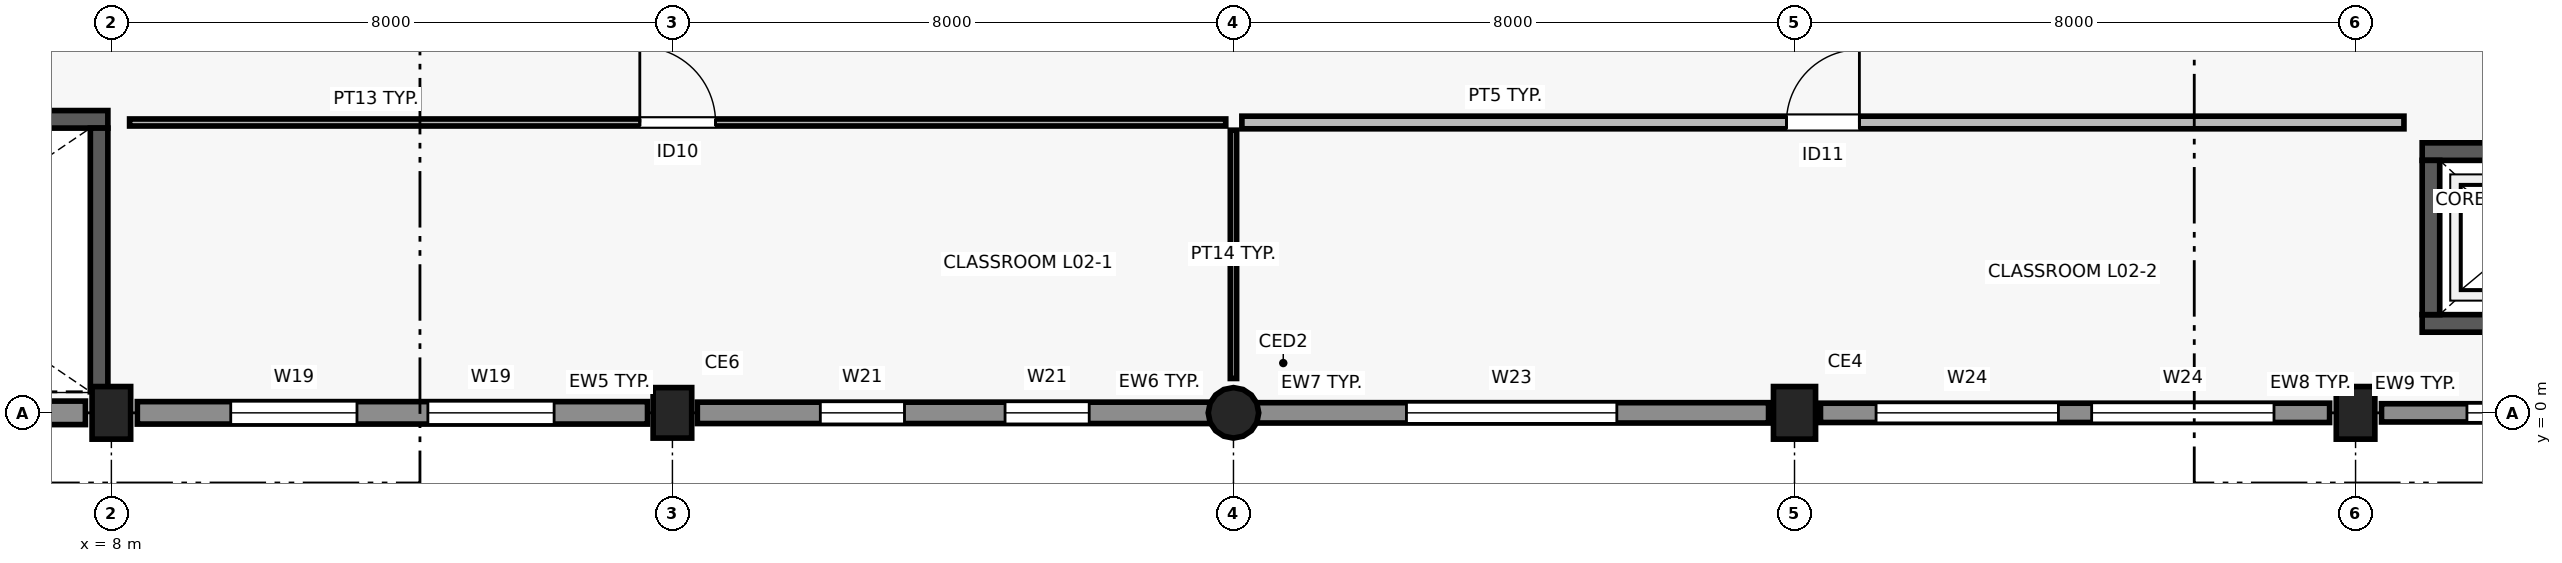
"""IFC4 building model, lengths in metres.
Left out: names, types, materials, properties, quantities, classifications, styles, units other than length and angle.
Written with IfcOpenShell. Run it as: python <this file> out.ifc"""

import sys

from ifc_helpers import new_model, si_unit, direction, frame, frame_2d, origin, origin_2d, place, context, subcontext, project, spatial, rectangle, circle, extrude, element, fill, save


model = new_model("IFC4")
c1 = context("Model", 3, precision=1e-05, world=origin(), true_north=direction((0.0, 1.0)))
c2 = subcontext(c1, "Body", "Model", "MODEL_VIEW")
j1 = project(units=[si_unit("LENGTHUNIT", "METRE"), si_unit("PLANEANGLEUNIT", "RADIAN")], contexts=[c1])
p1 = place(None, origin())
s1 = spatial("IfcSite", under=j1, at=p1, CompositionType="ELEMENT")
p2 = place(p1, origin())
s2 = spatial("IfcBuilding", under=s1, at=p2, CompositionType="ELEMENT")
p3 = place(p2, frame((0.0, 0.0, 9.0)))
s3 = spatial("IfcBuildingStorey", under=s2, at=p3, CompositionType="ELEMENT", Elevation=9.0)
p4 = place(p3, frame((8.0, 0.0, 0.0), z_axis=(0.0, 0.0, 1.0), x_axis=(1.0, 0.0, 0.0)))
e1 = element("IfcColumn", 1, at=p4, inside=s3, PredefinedType="COLUMN", context=c2, shape_type="SweptSolid", body=[
    extrude(rectangle(XDim=0.75, YDim=0.55, at=origin_2d()), origin(), (0.0, 0.0, 1.0), 4.2),
])
p5 = place(p3, frame((16.0, 0.0, 0.0), z_axis=(0.0, 0.0, 1.0), x_axis=(1.0, 0.0, 0.0)))
e2 = element("IfcColumn", 2, at=p5, inside=s3, PredefinedType="COLUMN", context=c2, shape_type="SweptSolid", body=[
    extrude(rectangle(XDim=0.72, YDim=0.55, at=origin_2d()), origin(), (0.0, 0.0, 1.0), 4.2),
])
p6 = place(p3, frame((24.0, 0.0, 0.0), z_axis=(0.0, 0.0, 1.0), x_axis=(1.0, 0.0, 0.0)))
e3 = element("IfcColumn", 3, at=p6, inside=s3, PredefinedType="COLUMN", context=c2, shape_type="SweptSolid", body=[
    extrude(circle(Radius=0.36, at=origin_2d()), origin(), (0.0, 0.0, 1.0), 4.2),
])
p7 = place(p3, frame((32.0, 0.0, 0.0), z_axis=(0.0, 0.0, 1.0), x_axis=(1.0, 0.0, 0.0)))
e4 = element("IfcColumn", 4, at=p7, inside=s3, PredefinedType="COLUMN", context=c2, shape_type="SweptSolid", body=[
    extrude(rectangle(XDim=0.75, YDim=0.6, at=origin_2d()), origin(), (0.0, 0.0, 1.0), 4.2),
])
p8 = place(p3, frame((40.0, 0.0, 0.0), z_axis=(0.0, 0.0, 1.0), x_axis=(1.0, 0.0, 0.0)))
e5 = element("IfcColumn", 5, at=p8, inside=s3, PredefinedType="COLUMN", context=c2, shape_type="SweptSolid", body=[
    extrude(rectangle(XDim=0.75, YDim=0.55, at=origin_2d()), origin(), (0.0, 0.0, 1.0), 4.2),
])
p9 = place(p3, frame((0.37, 0.0, 0.0), z_axis=(0.0, 0.0, 1.0), x_axis=(1.0, 0.0, 0.0)))
e6 = element("IfcWall", 6, at=p9, inside=s3, PredefinedType="SOLIDWALL", context=c2, shape_type="SweptSolid", body=[
    extrude(rectangle(XDim=7.26, YDim=0.335, at=frame_2d((3.63, 0.0))), origin(), (0.0, 0.0, 1.0), 3.92),
])
p10 = place(p3, frame((8.37, 0.0, 0.0), z_axis=(0.0, 0.0, 1.0), x_axis=(1.0, 0.0, 0.0)))
e7 = element("IfcWall", 7, at=p10, inside=s3, PredefinedType="SOLIDWALL", context=c2, shape_type="SweptSolid", body=[
    extrude(rectangle(XDim=7.275, YDim=0.32, at=frame_2d((3.637, 0.0))), origin(), (0.0, 0.0, 1.0), 3.92),
])
p11 = place(p10, frame((1.332, 0.0, 0.9)))
e8 = element("IfcOpeningElement", 8, at=p11, cuts=e7, PredefinedType="OPENING", context=c2, shape_type="SweptSolid", body=[
    extrude(rectangle(XDim=1.8, YDim=1.25, at=frame_2d((0.9, 0.625))), frame((0.0, 0.17, 0.0), z_axis=(0.0, -1.0, 0.0), x_axis=(1.0, 0.0, 0.0)), (0.0, 0.0, 1.0), 0.34),
])
p12 = place(p10, frame((4.143, 0.0, 0.9)))
e9 = element("IfcOpeningElement", 9, at=p12, cuts=e7, PredefinedType="OPENING", context=c2, shape_type="SweptSolid", body=[
    extrude(rectangle(XDim=1.8, YDim=1.25, at=frame_2d((0.9, 0.625))), frame((0.0, 0.17, 0.0), z_axis=(0.0, -1.0, 0.0), x_axis=(1.0, 0.0, 0.0)), (0.0, 0.0, 1.0), 0.34),
])
p13 = place(p3, frame((16.355, 0.0, 0.0), z_axis=(0.0, 0.0, 1.0), x_axis=(1.0, 0.0, 0.0)))
e10 = element("IfcWall", 10, at=p13, inside=s3, PredefinedType="SOLIDWALL", context=c2, shape_type="SweptSolid", body=[
    extrude(rectangle(XDim=7.343, YDim=0.305, at=frame_2d((3.671, 0.0))), origin(), (0.0, 0.0, 1.0), 3.27),
])
p14 = place(p13, frame((1.754, 0.0, 0.9)))
e11 = element("IfcOpeningElement", 11, at=p14, cuts=e10, PredefinedType="OPENING", context=c2, shape_type="SweptSolid", body=[
    extrude(rectangle(XDim=1.2, YDim=1.25, at=frame_2d((0.6, 0.625))), frame((0.0, 0.162, 0.0), z_axis=(0.0, -1.0, 0.0), x_axis=(1.0, 0.0, 0.0)), (0.0, 0.0, 1.0), 0.325),
])
p15 = place(p13, frame((4.388, 0.0, 0.9)))
e12 = element("IfcOpeningElement", 12, at=p15, cuts=e10, PredefinedType="OPENING", context=c2, shape_type="SweptSolid", body=[
    extrude(rectangle(XDim=1.2, YDim=1.25, at=frame_2d((0.6, 0.625))), frame((0.0, 0.162, 0.0), z_axis=(0.0, -1.0, 0.0), x_axis=(1.0, 0.0, 0.0)), (0.0, 0.0, 1.0), 0.325),
])
p16 = place(p3, frame((24.302, 0.0, 0.0), z_axis=(0.0, 0.0, 1.0), x_axis=(1.0, 0.0, 0.0)))
e13 = element("IfcWall", 13, at=p16, inside=s3, PredefinedType="SOLIDWALL", context=c2, shape_type="SweptSolid", body=[
    extrude(rectangle(XDim=7.327, YDim=0.29, at=frame_2d((3.664, 0.0))), origin(), (0.0, 0.0, 1.0), 3.27),
])
p17 = place(p16, frame((2.164, 0.0, 0.9)))
e14 = element("IfcOpeningElement", 14, at=p17, cuts=e13, PredefinedType="OPENING", context=c2, shape_type="SweptSolid", body=[
    extrude(rectangle(XDim=3.0, YDim=1.65, at=frame_2d((1.5, 0.825))), frame((0.0, 0.155, 0.0), z_axis=(0.0, -1.0, 0.0), x_axis=(1.0, 0.0, 0.0)), (0.0, 0.0, 1.0), 0.31),
])
p18 = place(p3, frame((32.37, 0.0, 0.0), z_axis=(0.0, 0.0, 1.0), x_axis=(1.0, 0.0, 0.0)))
e15 = element("IfcWall", 15, at=p18, inside=s3, PredefinedType="SOLIDWALL", context=c2, shape_type="SweptSolid", body=[
    extrude(rectangle(XDim=7.26, YDim=0.275, at=frame_2d((3.63, 0.0))), origin(), (0.0, 0.0, 1.0), 3.37),
])
p19 = place(p18, frame((0.793, 0.0, 0.9)))
e16 = element("IfcOpeningElement", 16, at=p19, cuts=e15, PredefinedType="OPENING", context=c2, shape_type="SweptSolid", body=[
    extrude(rectangle(XDim=2.6, YDim=1.65, at=frame_2d((1.3, 0.825))), frame((0.0, 0.147, 0.0), z_axis=(0.0, -1.0, 0.0), x_axis=(1.0, 0.0, 0.0)), (0.0, 0.0, 1.0), 0.295),
])
p20 = place(p18, frame((3.867, 0.0, 0.9)))
e17 = element("IfcOpeningElement", 17, at=p20, cuts=e15, PredefinedType="OPENING", context=c2, shape_type="SweptSolid", body=[
    extrude(rectangle(XDim=2.6, YDim=1.65, at=frame_2d((1.3, 0.825))), frame((0.0, 0.147, 0.0), z_axis=(0.0, -1.0, 0.0), x_axis=(1.0, 0.0, 0.0)), (0.0, 0.0, 1.0), 0.295),
])
p21 = place(p3, frame((40.37, 0.0, 0.0), z_axis=(0.0, 0.0, 1.0), x_axis=(1.0, 0.0, 0.0)))
e18 = element("IfcWall", 18, at=p21, inside=s3, PredefinedType="SOLIDWALL", context=c2, shape_type="SweptSolid", body=[
    extrude(rectangle(XDim=7.275, YDim=0.26, at=frame_2d((3.637, 0.0))), origin(), (0.0, 0.0, 1.0), 3.27),
])
p22 = place(p21, frame((1.218, 0.0, 0.9)))
e19 = element("IfcOpeningElement", 19, at=p22, cuts=e18, PredefinedType="OPENING", context=c2, shape_type="SweptSolid", body=[
    extrude(rectangle(XDim=2.4, YDim=1.8, at=frame_2d((1.2, 0.9))), frame((0.0, 0.14, 0.0), z_axis=(0.0, -1.0, 0.0), x_axis=(1.0, 0.0, 0.0)), (0.0, 0.0, 1.0), 0.28),
])
p23 = place(p21, frame((4.087, 0.0, 0.9)))
e20 = element("IfcOpeningElement", 20, at=p23, cuts=e18, PredefinedType="OPENING", context=c2, shape_type="SweptSolid", body=[
    extrude(rectangle(XDim=2.4, YDim=1.8, at=frame_2d((1.2, 0.9))), frame((0.0, 0.14, 0.0), z_axis=(0.0, -1.0, 0.0), x_axis=(1.0, 0.0, 0.0)), (0.0, 0.0, 1.0), 0.28),
])
p24 = place(p3, frame((40.95, 1.275, 0.0), z_axis=(0.0, 0.0, 1.0), x_axis=(1.0, 0.0, 0.0)))
e21 = element("IfcWall", 21, at=p24, inside=s3, PredefinedType="SHEAR", context=c2, shape_type="SweptSolid", body=[
    extrude(rectangle(XDim=2.9, YDim=0.25, at=frame_2d((1.45, 0.0))), origin(), (0.0, 0.0, 1.0), 3.92),
])
p25 = place(p3, frame((40.95, 3.725, 0.0), z_axis=(0.0, 0.0, 1.0), x_axis=(1.0, 0.0, 0.0)))
e22 = element("IfcWall", 22, at=p25, inside=s3, PredefinedType="SHEAR", context=c2, shape_type="SweptSolid", body=[
    extrude(rectangle(XDim=2.9, YDim=0.25, at=frame_2d((1.45, 0.0))), origin(), (0.0, 0.0, 1.0), 3.92),
])
p26 = place(p25, frame((0.95, 0.0, 0.0)))
e23 = element("IfcOpeningElement", 23, at=p26, cuts=e22, PredefinedType="OPENING", context=c2, shape_type="SweptSolid", body=[
    extrude(rectangle(XDim=1.0, YDim=2.15, at=frame_2d((0.5, 1.075))), frame((0.0, 0.135, 0.0), z_axis=(0.0, -1.0, 0.0), x_axis=(1.0, 0.0, 0.0)), (0.0, 0.0, 1.0), 0.27),
])
p27 = place(p3, frame((41.075, 1.4, 0.0), z_axis=(0.0, 0.0, 1.0), x_axis=(0.0, 1.0, 0.0)))
e24 = element("IfcWall", 24, at=p27, inside=s3, PredefinedType="SHEAR", context=c2, shape_type="SweptSolid", body=[
    extrude(rectangle(XDim=2.2, YDim=0.25, at=frame_2d((1.1, 0.0))), origin(), (0.0, 0.0, 1.0), 3.92),
])
p28 = place(p3, frame((0.05, 4.185, 0.0), z_axis=(0.0, 0.0, 1.0), x_axis=(1.0, 0.0, 0.0)))
e25 = element("IfcWall", 25, at=p28, inside=s3, PredefinedType="SHEAR", context=c2, shape_type="SweptSolid", body=[
    extrude(rectangle(XDim=7.9, YDim=0.25, at=frame_2d((3.95, 0.0))), origin(), (0.0, 0.0, 1.0), 3.92),
])
p29 = place(p28, frame((0.5, 0.0, 0.0)))
e26 = element("IfcOpeningElement", 26, at=p29, cuts=e25, PredefinedType="OPENING", context=c2, shape_type="SweptSolid", body=[
    extrude(rectangle(XDim=1.25, YDim=2.2, at=frame_2d((0.625, 1.1))), frame((0.0, 0.135, 0.0), z_axis=(0.0, -1.0, 0.0), x_axis=(1.0, 0.0, 0.0)), (0.0, 0.0, 1.0), 0.27),
])
p30 = place(p3, frame((7.825, 0.3, 0.0), z_axis=(0.0, 0.0, 1.0), x_axis=(0.0, 1.0, 0.0)))
e27 = element("IfcWall", 27, at=p30, inside=s3, PredefinedType="SHEAR", context=c2, shape_type="SweptSolid", body=[
    extrude(rectangle(XDim=3.76, YDim=0.25, at=frame_2d((1.88, 0.0))), origin(), (0.0, 0.0, 1.0), 3.92),
])
p31 = place(p3, frame((8.26, 4.14, 0.0), z_axis=(0.0, 0.0, 1.0), x_axis=(1.0, 0.0, 0.0)))
e28 = element("IfcWall", 28, at=p31, inside=s3, PredefinedType="PARTITIONING", context=c2, shape_type="SweptSolid", body=[
    extrude(rectangle(XDim=15.63, YDim=0.1, at=frame_2d((7.815, 0.0))), origin(), (0.0, 0.0, 1.0), 3.9),
])
p32 = place(p31, frame((7.275, 0.0, 0.0)))
e29 = element("IfcOpeningElement", 29, at=p32, cuts=e28, PredefinedType="OPENING", context=c2, shape_type="SweptSolid", body=[
    extrude(rectangle(XDim=1.08, YDim=2.15, at=frame_2d((0.54, 1.075))), frame((0.0, 0.06, 0.0), z_axis=(0.0, -1.0, 0.0), x_axis=(1.0, 0.0, 0.0)), (0.0, 0.0, 1.0), 0.12),
])
p33 = place(p3, frame((24.0, 0.49, 0.0), z_axis=(0.0, 0.0, 1.0), x_axis=(0.0, 1.0, 0.0)))
e30 = element("IfcWall", 30, at=p33, inside=s3, PredefinedType="PARTITIONING", context=c2, shape_type="SweptSolid", body=[
    extrude(rectangle(XDim=3.54, YDim=0.09, at=frame_2d((1.77, 0.0))), origin(), (0.0, 0.0, 1.0), 3.24),
])
p34 = place(p3, frame((24.12, 4.14, 0.0), z_axis=(0.0, 0.0, 1.0), x_axis=(1.0, 0.0, 0.0)))
e31 = element("IfcWall", 31, at=p34, inside=s3, PredefinedType="PARTITIONING", context=c2, shape_type="SweptSolid", body=[
    extrude(rectangle(XDim=16.57, YDim=0.18, at=frame_2d((8.285, 0.0))), origin(), (0.0, 0.0, 1.0), 3.9),
])
p35 = place(p34, frame((7.765, 0.0, 0.0)))
e32 = element("IfcOpeningElement", 32, at=p35, cuts=e31, PredefinedType="OPENING", context=c2, shape_type="SweptSolid", body=[
    extrude(rectangle(XDim=1.04, YDim=2.15, at=frame_2d((0.52, 1.075))), frame((0.0, 0.1, 0.0), z_axis=(0.0, -1.0, 0.0), x_axis=(1.0, 0.0, 0.0)), (0.0, 0.0, 1.0), 0.2),
])
p36 = place(p11, origin())
e33 = element("IfcWindow", 33, at=p36, inside=s3, PartitioningType="SINGLE_PANEL", PredefinedType="WINDOW", context=c2, shape_type="SweptSolid", body=[
    extrude(rectangle(XDim=1.8, YDim=1.25, at=frame_2d((0.9, 0.625))), frame((0.0, 0.03, 0.0), z_axis=(0.0, -1.0, 0.0), x_axis=(1.0, 0.0, 0.0)), (0.0, 0.0, 1.0), 0.06),
])
fill(e8, e33)
p37 = place(p12, origin())
e34 = element("IfcWindow", 34, at=p37, inside=s3, PartitioningType="SINGLE_PANEL", PredefinedType="WINDOW", context=c2, shape_type="SweptSolid", body=[
    extrude(rectangle(XDim=1.8, YDim=1.25, at=frame_2d((0.9, 0.625))), frame((0.0, 0.03, 0.0), z_axis=(0.0, -1.0, 0.0), x_axis=(1.0, 0.0, 0.0)), (0.0, 0.0, 1.0), 0.06),
])
fill(e9, e34)
p38 = place(p14, origin())
e35 = element("IfcWindow", 35, at=p38, inside=s3, PartitioningType="SINGLE_PANEL", PredefinedType="WINDOW", context=c2, shape_type="SweptSolid", body=[
    extrude(rectangle(XDim=1.2, YDim=1.25, at=frame_2d((0.6, 0.625))), frame((0.0, 0.03, 0.0), z_axis=(0.0, -1.0, 0.0), x_axis=(1.0, 0.0, 0.0)), (0.0, 0.0, 1.0), 0.06),
])
fill(e11, e35)
p39 = place(p15, origin())
e36 = element("IfcWindow", 36, at=p39, inside=s3, PartitioningType="SINGLE_PANEL", PredefinedType="WINDOW", context=c2, shape_type="SweptSolid", body=[
    extrude(rectangle(XDim=1.2, YDim=1.25, at=frame_2d((0.6, 0.625))), frame((0.0, 0.03, 0.0), z_axis=(0.0, -1.0, 0.0), x_axis=(1.0, 0.0, 0.0)), (0.0, 0.0, 1.0), 0.06),
])
fill(e12, e36)
p40 = place(p17, origin())
e37 = element("IfcWindow", 37, at=p40, inside=s3, PartitioningType="SINGLE_PANEL", PredefinedType="WINDOW", context=c2, shape_type="SweptSolid", body=[
    extrude(rectangle(XDim=3.0, YDim=1.65, at=frame_2d((1.5, 0.825))), frame((0.0, 0.03, 0.0), z_axis=(0.0, -1.0, 0.0), x_axis=(1.0, 0.0, 0.0)), (0.0, 0.0, 1.0), 0.06),
])
fill(e14, e37)
p41 = place(p19, origin())
e38 = element("IfcWindow", 38, at=p41, inside=s3, PartitioningType="SINGLE_PANEL", PredefinedType="WINDOW", context=c2, shape_type="SweptSolid", body=[
    extrude(rectangle(XDim=2.6, YDim=1.65, at=frame_2d((1.3, 0.825))), frame((0.0, 0.03, 0.0), z_axis=(0.0, -1.0, 0.0), x_axis=(1.0, 0.0, 0.0)), (0.0, 0.0, 1.0), 0.06),
])
fill(e16, e38)
p42 = place(p20, origin())
e39 = element("IfcWindow", 39, at=p42, inside=s3, PartitioningType="SINGLE_PANEL", PredefinedType="WINDOW", context=c2, shape_type="SweptSolid", body=[
    extrude(rectangle(XDim=2.6, YDim=1.65, at=frame_2d((1.3, 0.825))), frame((0.0, 0.03, 0.0), z_axis=(0.0, -1.0, 0.0), x_axis=(1.0, 0.0, 0.0)), (0.0, 0.0, 1.0), 0.06),
])
fill(e17, e39)
p43 = place(p22, origin())
e40 = element("IfcWindow", 40, at=p43, inside=s3, PartitioningType="SINGLE_PANEL", PredefinedType="WINDOW", context=c2, shape_type="SweptSolid", body=[
    extrude(rectangle(XDim=2.4, YDim=1.8, at=frame_2d((1.2, 0.9))), frame((0.0, 0.03, 0.0), z_axis=(0.0, -1.0, 0.0), x_axis=(1.0, 0.0, 0.0)), (0.0, 0.0, 1.0), 0.06),
])
fill(e19, e40)
p44 = place(p32, origin())
e41 = element("IfcDoor", 41, at=p44, inside=s3, OperationType="SINGLE_SWING_LEFT", PredefinedType="DOOR", context=c2, shape_type="SweptSolid", body=[
    extrude(rectangle(XDim=1.08, YDim=2.15, at=frame_2d((0.54, 1.075))), frame((0.0, 0.025, 0.0), z_axis=(0.0, -1.0, 0.0), x_axis=(1.0, 0.0, 0.0)), (0.0, 0.0, 1.0), 0.05),
])
fill(e29, e41)
p45 = place(p35, origin())
e42 = element("IfcDoor", 42, at=p45, inside=s3, OperationType="SINGLE_SWING_RIGHT", PredefinedType="DOOR", context=c2, shape_type="SweptSolid", body=[
    extrude(rectangle(XDim=1.04, YDim=2.15, at=frame_2d((0.52, 1.075))), frame((0.0, 0.025, 0.0), z_axis=(0.0, -1.0, 0.0), x_axis=(1.0, 0.0, 0.0)), (0.0, 0.0, 1.0), 0.05),
])
fill(e32, e42)
save(model, sys.argv[1])
